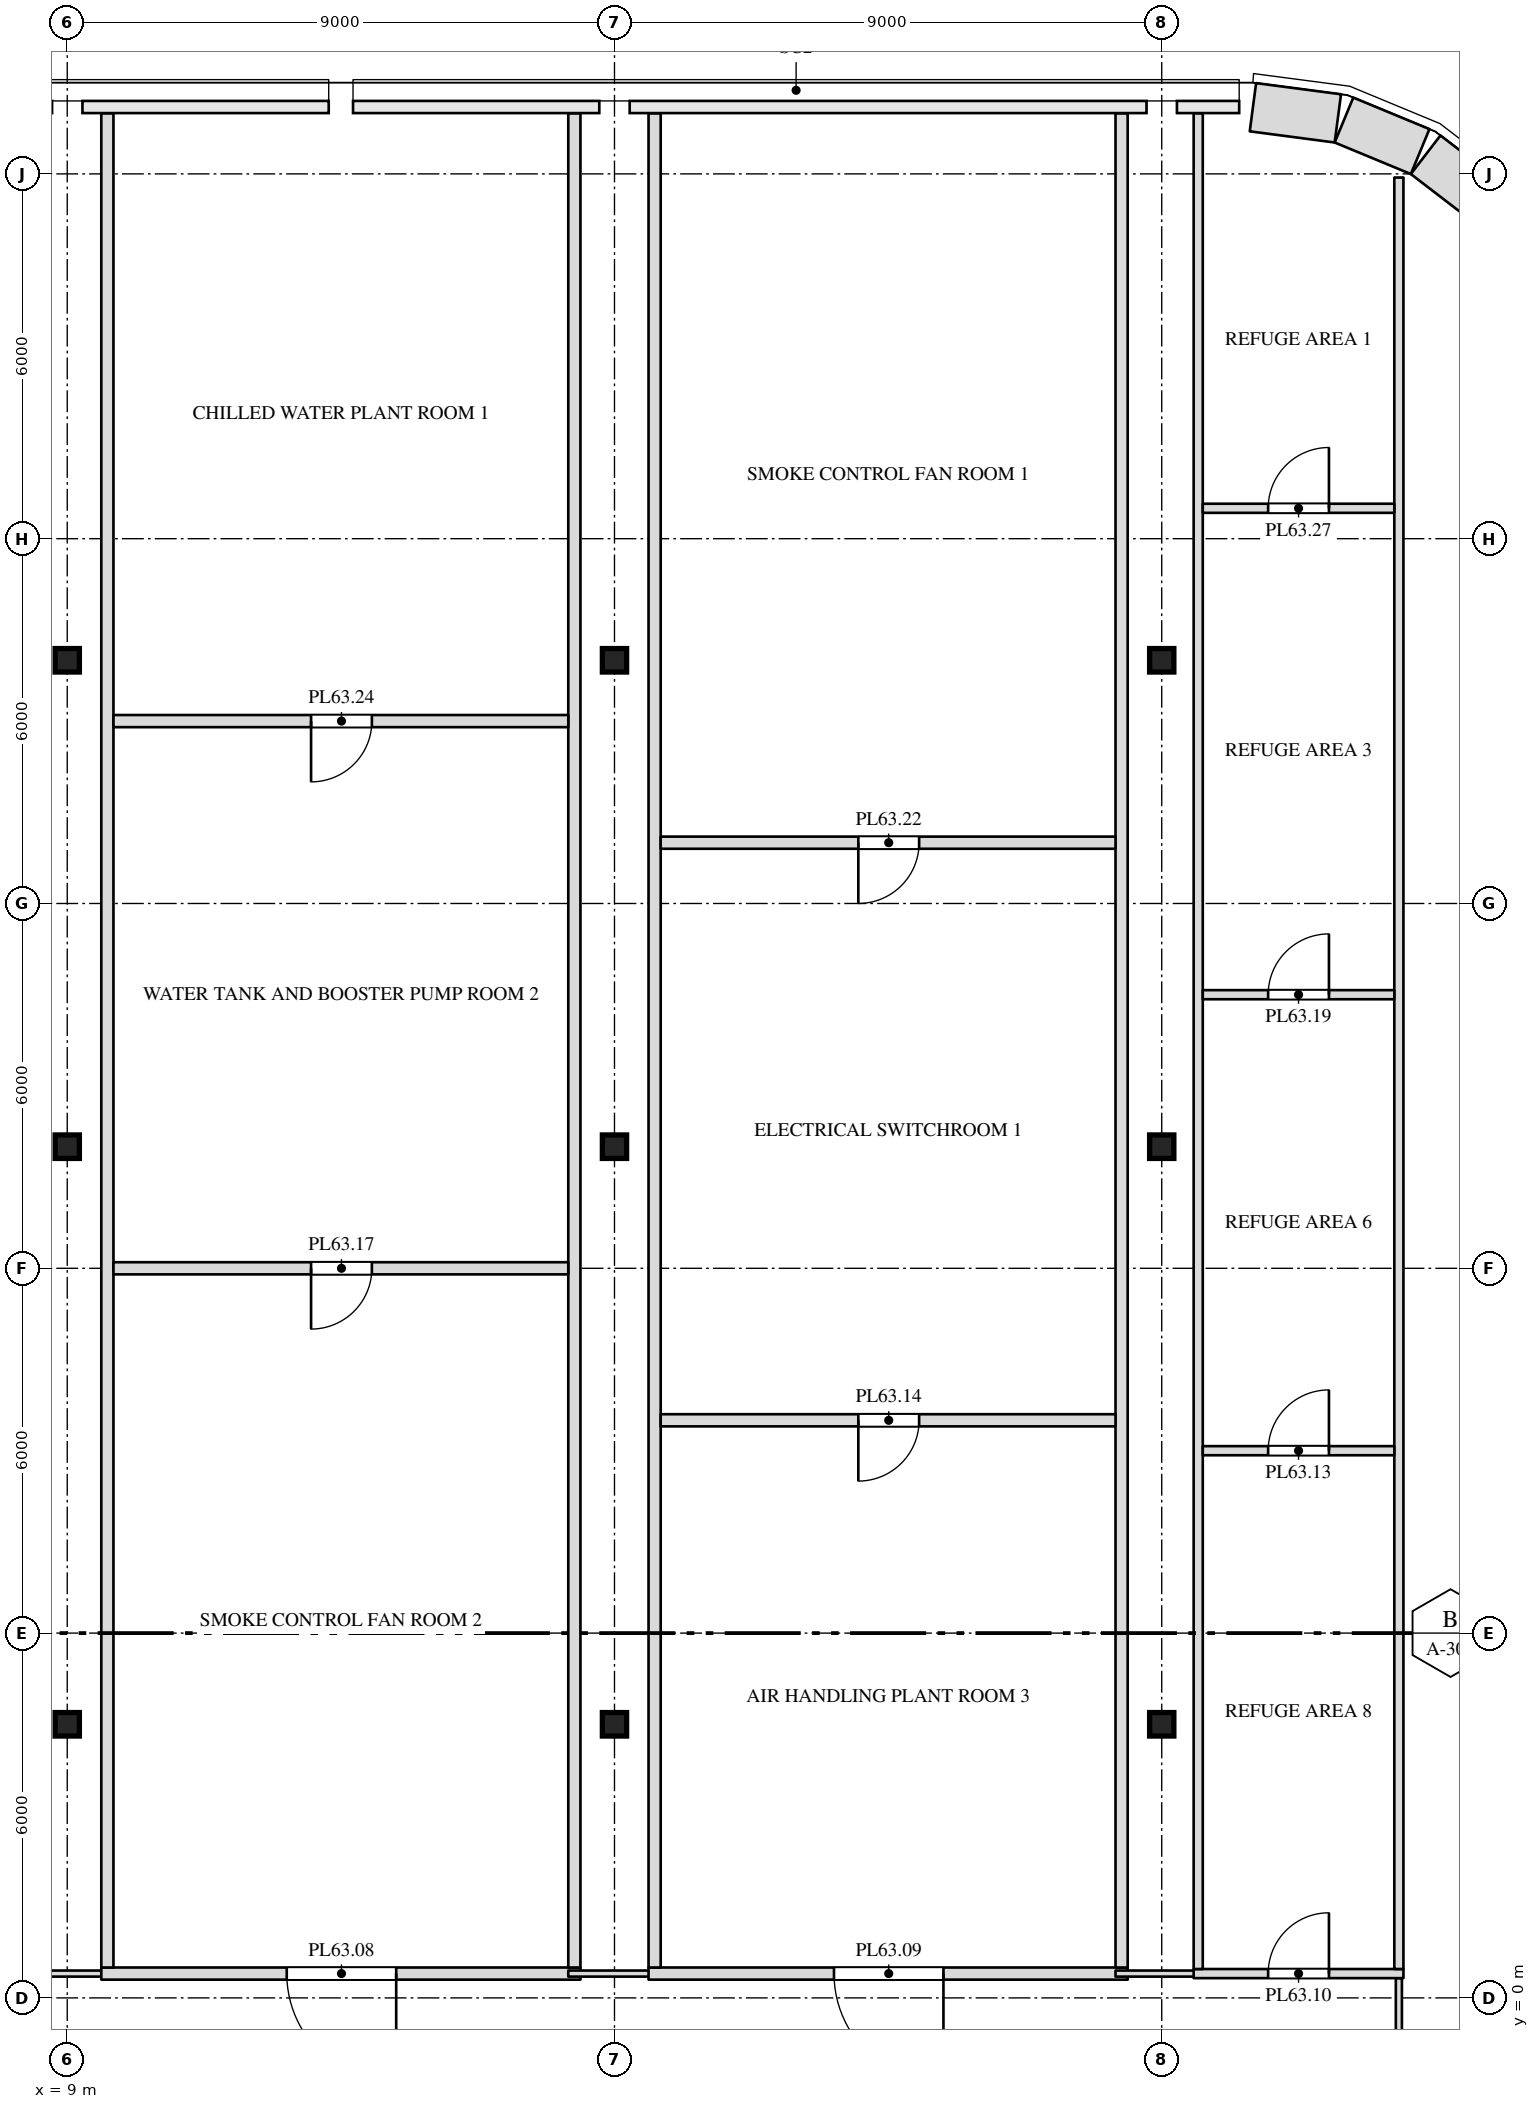
"""IFC4 building model, lengths in metres.
Left out: names, types, materials, properties, quantities, classifications, styles, units other than length and angle.
Written with IfcOpenShell. Run it as: python <this file> out.ifc"""

import sys

from ifc_helpers import new_model, si_unit, direction, frame, frame_2d, origin, origin_2d, place, context, subcontext, project, spatial, rectangle, i_section, extrude, element, fill, save


model = new_model("IFC4")
c1 = context("Model", 3, precision=1e-05, world=origin(), true_north=direction((0.0, 1.0)))
c2 = subcontext(c1, "Body", "Model", "MODEL_VIEW")
j1 = project(units=[si_unit("LENGTHUNIT", "METRE"), si_unit("PLANEANGLEUNIT", "RADIAN")], contexts=[c1])
p1 = place(None, origin())
s1 = spatial("IfcSite", under=j1, at=p1, CompositionType="ELEMENT")
p2 = place(p1, origin())
s2 = spatial("IfcBuilding", under=s1, at=p2, CompositionType="ELEMENT")
p3 = place(p2, frame((0.0, 0.0, 268.5)))
s3 = spatial("IfcBuildingStorey", under=s2, at=p3, CompositionType="ELEMENT", Elevation=268.5)
for number, where, z_axis, x_axis in (
    (1, (9.0, 4.5, 0.0), (0.0, 0.0, 1.0), (1.0, 0.0, 0.0)),
    (2, (18.0, 4.5, 0.0), (0.0, 0.0, 1.0), (1.0, 0.0, 0.0)),
    (3, (27.0, 4.5, 0.0), (0.0, 0.0, 1.0), (1.0, 0.0, 0.0)),
    (4, (9.0, 14.0, 0.0), (0.0, 0.0, 1.0), (1.0, 0.0, 0.0)),
    (5, (18.0, 14.0, 0.0), (0.0, 0.0, 1.0), (1.0, 0.0, 0.0)),
    (6, (27.0, 14.0, 0.0), (0.0, 0.0, 1.0), (1.0, 0.0, 0.0)),
    (7, (9.0, 22.0, 0.0), (0.0, 0.0, 1.0), (1.0, 0.0, 0.0)),
    (8, (18.0, 22.0, 0.0), (0.0, 0.0, 1.0), (1.0, 0.0, 0.0)),
    (9, (27.0, 22.0, 0.0), (0.0, 0.0, 1.0), (1.0, 0.0, 0.0)),
):
    element("IfcColumn", number, at=place(p3, frame(where, z_axis=z_axis, x_axis=x_axis)), inside=s3, PredefinedType="COLUMN", context=c2, shape_type="SweptSolid", body=[
        extrude(i_section(OverallWidth=0.399, OverallDepth=0.386, WebThickness=0.021, FlangeThickness=0.033, at=origin_2d()), origin(), (0.0, 0.0, 1.0), 4.0),
    ])
p4 = place(p3, frame((30.9, -1.925, 0.0), z_axis=(0.0, 0.0, 1.0), x_axis=(0.0, 1.0, 0.0)))
e10 = element("IfcWall", 10, at=p4, inside=s3, PredefinedType="PARTITIONING", context=c2, shape_type="SweptSolid", body=[
    extrude(rectangle(XDim=2.25, YDim=0.1, at=frame_2d((1.125, 0.0))), origin(), (0.0, 0.0, 1.0), 3.78),
])
p5 = place(p3, frame((8.24, 0.4, 0.0), z_axis=(0.0, 0.0, 1.0), x_axis=(1.0, 0.0, 0.0)))
e11 = element("IfcWall", 11, at=p5, inside=s3, PredefinedType="PARTITIONING", context=c2, shape_type="SweptSolid", body=[
    extrude(rectangle(XDim=1.52, YDim=0.1, at=frame_2d((0.76, 0.0))), origin(), (0.0, 0.0, 1.0), 3.78),
])
p6 = place(p3, frame((9.56, 0.4, 0.0), z_axis=(0.0, 0.0, 1.0), x_axis=(1.0, 0.0, 0.0)))
e12 = element("IfcWall", 12, at=p6, inside=s3, PredefinedType="PARTITIONING", context=c2, shape_type="SweptSolid", body=[
    extrude(rectangle(XDim=7.88, YDim=0.2, at=frame_2d((3.94, 0.0))), origin(), (0.0, 0.0, 1.0), 3.78),
])
p7 = place(p6, frame((3.05, 0.0, 0.0)))
e13 = element("IfcOpeningElement", 13, at=p7, cuts=e12, PredefinedType="OPENING", context=c2, shape_type="SweptSolid", body=[
    extrude(rectangle(XDim=1.8, YDim=2.1, at=frame_2d((0.9, 1.05))), frame((0.0, 0.112, 0.0), z_axis=(0.0, -1.0, 0.0), x_axis=(1.0, 0.0, 0.0)), (0.0, 0.0, 1.0), 0.224),
])
p8 = place(p3, frame((9.66, 0.5, 0.0), z_axis=(0.0, 0.0, 1.0), x_axis=(0.0, 1.0, 0.0)))
e14 = element("IfcWall", 14, at=p8, inside=s3, PredefinedType="PARTITIONING", context=c2, shape_type="SweptSolid", body=[
    extrude(rectangle(XDim=30.496, YDim=0.2, at=frame_2d((15.248, 0.0))), origin(), (0.0, 0.0, 1.0), 3.78),
])
p9 = place(p3, frame((17.24, 0.4, 0.0), z_axis=(0.0, 0.0, 1.0), x_axis=(1.0, 0.0, 0.0)))
e15 = element("IfcWall", 15, at=p9, inside=s3, PredefinedType="PARTITIONING", context=c2, shape_type="SweptSolid", body=[
    extrude(rectangle(XDim=1.52, YDim=0.1, at=frame_2d((0.76, 0.0))), origin(), (0.0, 0.0, 1.0), 3.78),
])
p10 = place(p3, frame((17.34, 0.5, 0.0), z_axis=(0.0, 0.0, 1.0), x_axis=(0.0, 1.0, 0.0)))
e16 = element("IfcWall", 16, at=p10, inside=s3, PredefinedType="PARTITIONING", context=c2, shape_type="SweptSolid", body=[
    extrude(rectangle(XDim=30.496, YDim=0.2, at=frame_2d((15.248, 0.0))), origin(), (0.0, 0.0, 1.0), 3.78),
])
p11 = place(p3, frame((18.56, 0.4, 0.0), z_axis=(0.0, 0.0, 1.0), x_axis=(1.0, 0.0, 0.0)))
e17 = element("IfcWall", 17, at=p11, inside=s3, PredefinedType="PARTITIONING", context=c2, shape_type="SweptSolid", body=[
    extrude(rectangle(XDim=7.88, YDim=0.2, at=frame_2d((3.94, 0.0))), origin(), (0.0, 0.0, 1.0), 3.78),
])
p12 = place(p11, frame((3.05, 0.0, 0.0)))
e18 = element("IfcOpeningElement", 18, at=p12, cuts=e17, PredefinedType="OPENING", context=c2, shape_type="SweptSolid", body=[
    extrude(rectangle(XDim=1.8, YDim=2.1, at=frame_2d((0.9, 1.05))), frame((0.0, 0.112, 0.0), z_axis=(0.0, -1.0, 0.0), x_axis=(1.0, 0.0, 0.0)), (0.0, 0.0, 1.0), 0.224),
])
p13 = place(p3, frame((18.66, 0.5, 0.0), z_axis=(0.0, 0.0, 1.0), x_axis=(0.0, 1.0, 0.0)))
e19 = element("IfcWall", 19, at=p13, inside=s3, PredefinedType="PARTITIONING", context=c2, shape_type="SweptSolid", body=[
    extrude(rectangle(XDim=30.496, YDim=0.2, at=frame_2d((15.248, 0.0))), origin(), (0.0, 0.0, 1.0), 3.78),
])
p14 = place(p3, frame((26.24, 0.4, 0.0), z_axis=(0.0, 0.0, 1.0), x_axis=(1.0, 0.0, 0.0)))
e20 = element("IfcWall", 20, at=p14, inside=s3, PredefinedType="PARTITIONING", context=c2, shape_type="SweptSolid", body=[
    extrude(rectangle(XDim=1.435, YDim=0.1, at=frame_2d((0.718, 0.0))), origin(), (0.0, 0.0, 1.0), 3.78),
])
p15 = place(p3, frame((26.34, 0.5, 0.0), z_axis=(0.0, 0.0, 1.0), x_axis=(0.0, 1.0, 0.0)))
e21 = element("IfcWall", 21, at=p15, inside=s3, PredefinedType="PARTITIONING", context=c2, shape_type="SweptSolid", body=[
    extrude(rectangle(XDim=30.496, YDim=0.2, at=frame_2d((15.248, 0.0))), origin(), (0.0, 0.0, 1.0), 3.78),
])
p16 = place(p3, frame((27.525, 0.4, 0.0), z_axis=(0.0, 0.0, 1.0), x_axis=(1.0, 0.0, 0.0)))
e22 = element("IfcWall", 22, at=p16, inside=s3, PredefinedType="PARTITIONING", context=c2, shape_type="SweptSolid", body=[
    extrude(rectangle(XDim=3.45, YDim=0.15, at=frame_2d((1.725, 0.0))), origin(), (0.0, 0.0, 1.0), 3.78),
])
p17 = place(p16, frame((1.225, 0.0, 0.0)))
e23 = element("IfcOpeningElement", 23, at=p17, cuts=e22, PredefinedType="OPENING", context=c2, shape_type="SweptSolid", body=[
    extrude(rectangle(XDim=1.0, YDim=2.1, at=frame_2d((0.5, 1.05))), frame((0.0, 0.087, 0.0), z_axis=(0.0, -1.0, 0.0), x_axis=(1.0, 0.0, 0.0)), (0.0, 0.0, 1.0), 0.174),
])
p18 = place(p3, frame((27.6, 0.475, 0.0), z_axis=(0.0, 0.0, 1.0), x_axis=(0.0, 1.0, 0.0)))
e24 = element("IfcWall", 24, at=p18, inside=s3, PredefinedType="PARTITIONING", context=c2, shape_type="SweptSolid", body=[
    extrude(rectangle(XDim=30.521, YDim=0.15, at=frame_2d((15.26, 0.0))), origin(), (0.0, 0.0, 1.0), 3.78),
])
p19 = place(p3, frame((30.9, 0.475, 0.0), z_axis=(0.0, 0.0, 1.0), x_axis=(0.0, 1.0, 0.0)))
e25 = element("IfcWall", 25, at=p19, inside=s3, PredefinedType="PARTITIONING", context=c2, shape_type="SweptSolid", body=[
    extrude(rectangle(XDim=29.465, YDim=0.15, at=frame_2d((14.732, 0.0))), origin(), (0.0, 0.0, 1.0), 3.78),
])
p20 = place(p3, frame((27.675, 9.0, 0.0), z_axis=(0.0, 0.0, 1.0), x_axis=(1.0, 0.0, 0.0)))
e26 = element("IfcWall", 26, at=p20, inside=s3, PredefinedType="PARTITIONING", context=c2, shape_type="SweptSolid", body=[
    extrude(rectangle(XDim=3.15, YDim=0.15, at=frame_2d((1.575, 0.0))), origin(), (0.0, 0.0, 1.0), 3.247),
])
p21 = place(p20, frame((1.075, 0.0, 0.0)))
e27 = element("IfcOpeningElement", 27, at=p21, cuts=e26, PredefinedType="OPENING", context=c2, shape_type="SweptSolid", body=[
    extrude(rectangle(XDim=1.0, YDim=2.1, at=frame_2d((0.5, 1.05))), frame((0.0, 0.087, 0.0), z_axis=(0.0, -1.0, 0.0), x_axis=(1.0, 0.0, 0.0)), (0.0, 0.0, 1.0), 0.174),
])
p22 = place(p3, frame((18.76, 9.5, 0.0), z_axis=(0.0, 0.0, 1.0), x_axis=(1.0, 0.0, 0.0)))
e28 = element("IfcWall", 28, at=p22, inside=s3, PredefinedType="PARTITIONING", context=c2, shape_type="SweptSolid", body=[
    extrude(rectangle(XDim=7.48, YDim=0.2, at=frame_2d((3.74, 0.0))), origin(), (0.0, 0.0, 1.0), 3.78),
])
p23 = place(p22, frame((3.25, 0.0, 0.0)))
e29 = element("IfcOpeningElement", 29, at=p23, cuts=e28, PredefinedType="OPENING", context=c2, shape_type="SweptSolid", body=[
    extrude(rectangle(XDim=1.0, YDim=2.1, at=frame_2d((0.5, 1.05))), frame((0.0, 0.112, 0.0), z_axis=(0.0, -1.0, 0.0), x_axis=(1.0, 0.0, 0.0)), (0.0, 0.0, 1.0), 0.224),
])
p24 = place(p3, frame((9.76, 12.0, 0.0), z_axis=(0.0, 0.0, 1.0), x_axis=(1.0, 0.0, 0.0)))
e30 = element("IfcWall", 30, at=p24, inside=s3, PredefinedType="PARTITIONING", context=c2, shape_type="SweptSolid", body=[
    extrude(rectangle(XDim=7.48, YDim=0.2, at=frame_2d((3.74, 0.0))), origin(), (0.0, 0.0, 1.0), 3.78),
])
p25 = place(p24, frame((3.25, 0.0, 0.0)))
e31 = element("IfcOpeningElement", 31, at=p25, cuts=e30, PredefinedType="OPENING", context=c2, shape_type="SweptSolid", body=[
    extrude(rectangle(XDim=1.0, YDim=2.1, at=frame_2d((0.5, 1.05))), frame((0.0, 0.112, 0.0), z_axis=(0.0, -1.0, 0.0), x_axis=(1.0, 0.0, 0.0)), (0.0, 0.0, 1.0), 0.224),
])
p26 = place(p3, frame((27.675, 16.5, 0.0), z_axis=(0.0, 0.0, 1.0), x_axis=(1.0, 0.0, 0.0)))
e32 = element("IfcWall", 32, at=p26, inside=s3, PredefinedType="PARTITIONING", context=c2, shape_type="SweptSolid", body=[
    extrude(rectangle(XDim=3.15, YDim=0.15, at=frame_2d((1.575, 0.0))), origin(), (0.0, 0.0, 1.0), 3.78),
])
p27 = place(p26, frame((1.075, 0.0, 0.0)))
e33 = element("IfcOpeningElement", 33, at=p27, cuts=e32, PredefinedType="OPENING", context=c2, shape_type="SweptSolid", body=[
    extrude(rectangle(XDim=1.0, YDim=2.1, at=frame_2d((0.5, 1.05))), frame((0.0, 0.087, 0.0), z_axis=(0.0, -1.0, 0.0), x_axis=(1.0, 0.0, 0.0)), (0.0, 0.0, 1.0), 0.174),
])
p28 = place(p3, frame((18.76, 19.0, 0.0), z_axis=(0.0, 0.0, 1.0), x_axis=(1.0, 0.0, 0.0)))
e34 = element("IfcWall", 34, at=p28, inside=s3, PredefinedType="PARTITIONING", context=c2, shape_type="SweptSolid", body=[
    extrude(rectangle(XDim=7.48, YDim=0.2, at=frame_2d((3.74, 0.0))), origin(), (0.0, 0.0, 1.0), 3.78),
])
p29 = place(p28, frame((3.25, 0.0, 0.0)))
e35 = element("IfcOpeningElement", 35, at=p29, cuts=e34, PredefinedType="OPENING", context=c2, shape_type="SweptSolid", body=[
    extrude(rectangle(XDim=1.0, YDim=2.1, at=frame_2d((0.5, 1.05))), frame((0.0, 0.112, 0.0), z_axis=(0.0, -1.0, 0.0), x_axis=(1.0, 0.0, 0.0)), (0.0, 0.0, 1.0), 0.224),
])
p30 = place(p3, frame((9.76, 21.0, 0.0), z_axis=(0.0, 0.0, 1.0), x_axis=(1.0, 0.0, 0.0)))
e36 = element("IfcWall", 36, at=p30, inside=s3, PredefinedType="PARTITIONING", context=c2, shape_type="SweptSolid", body=[
    extrude(rectangle(XDim=7.48, YDim=0.2, at=frame_2d((3.74, 0.0))), origin(), (0.0, 0.0, 1.0), 3.78),
])
p31 = place(p30, frame((3.25, 0.0, 0.0)))
e37 = element("IfcOpeningElement", 37, at=p31, cuts=e36, PredefinedType="OPENING", context=c2, shape_type="SweptSolid", body=[
    extrude(rectangle(XDim=1.0, YDim=2.1, at=frame_2d((0.5, 1.05))), frame((0.0, 0.112, 0.0), z_axis=(0.0, -1.0, 0.0), x_axis=(1.0, 0.0, 0.0)), (0.0, 0.0, 1.0), 0.224),
])
p32 = place(p3, frame((27.675, 24.5, 0.0), z_axis=(0.0, 0.0, 1.0), x_axis=(1.0, 0.0, 0.0)))
e38 = element("IfcWall", 38, at=p32, inside=s3, PredefinedType="PARTITIONING", context=c2, shape_type="SweptSolid", body=[
    extrude(rectangle(XDim=3.15, YDim=0.15, at=frame_2d((1.575, 0.0))), origin(), (0.0, 0.0, 1.0), 3.78),
])
p33 = place(p32, frame((1.075, 0.0, 0.0)))
e39 = element("IfcOpeningElement", 39, at=p33, cuts=e38, PredefinedType="OPENING", context=c2, shape_type="SweptSolid", body=[
    extrude(rectangle(XDim=1.0, YDim=2.1, at=frame_2d((0.5, 1.05))), frame((0.0, 0.087, 0.0), z_axis=(0.0, -1.0, 0.0), x_axis=(1.0, 0.0, 0.0)), (0.0, 0.0, 1.0), 0.174),
])
p34 = place(p3, frame((32.416, 29.489, 0.0), z_axis=(0.0, 0.0, 1.0), x_axis=(-0.793272915452, 0.608866226366, 0.0)))
e40 = element("IfcWall", 40, at=p34, inside=s3, PredefinedType="SOLIDWALL", context=c2, shape_type="SweptSolid", body=[
    extrude(rectangle(XDim=1.356, YDim=0.8, at=frame_2d((0.678, 0.0))), origin(), (0.0, 0.0, 1.0), 3.78),
])
p35 = place(p3, frame((31.25, 30.367, 0.0), z_axis=(0.0, 0.0, 1.0), x_axis=(-0.923847774587, 0.38276009378, 0.0)))
e41 = element("IfcWall", 41, at=p35, inside=s3, PredefinedType="SOLIDWALL", context=c2, shape_type="SweptSolid", body=[
    extrude(rectangle(XDim=1.355, YDim=0.8, at=frame_2d((0.678, 0.0))), origin(), (0.0, 0.0, 1.0), 3.78),
])
p36 = place(p3, frame((29.896, 30.913, 0.0), z_axis=(0.0, 0.0, 1.0), x_axis=(-0.99144603414, 0.130517283865, 0.0)))
e42 = element("IfcWall", 42, at=p36, inside=s3, PredefinedType="SOLIDWALL", context=c2, shape_type="SweptSolid", body=[
    extrude(rectangle(XDim=1.408, YDim=0.8, at=frame_2d((0.704, 0.0))), origin(), (0.0, 0.0, 1.0), 3.78),
])
p37 = place(p7, origin())
e43 = element("IfcDoor", 43, at=p37, inside=s3, OperationType="DOUBLE_DOOR_SINGLE_SWING", PredefinedType="DOOR", context=c2, shape_type="SweptSolid", body=[
    extrude(rectangle(XDim=1.8, YDim=2.1, at=frame_2d((0.9, 1.05))), frame((0.0, 0.025, 0.0), z_axis=(0.0, -1.0, 0.0), x_axis=(1.0, 0.0, 0.0)), (0.0, 0.0, 1.0), 0.05),
])
fill(e13, e43)
p38 = place(p12, origin())
e44 = element("IfcDoor", 44, at=p38, inside=s3, OperationType="DOUBLE_DOOR_SINGLE_SWING", PredefinedType="DOOR", context=c2, shape_type="SweptSolid", body=[
    extrude(rectangle(XDim=1.8, YDim=2.1, at=frame_2d((0.9, 1.05))), frame((0.0, 0.025, 0.0), z_axis=(0.0, -1.0, 0.0), x_axis=(1.0, 0.0, 0.0)), (0.0, 0.0, 1.0), 0.05),
])
fill(e18, e44)
p39 = place(p17, origin())
e45 = element("IfcDoor", 45, at=p39, inside=s3, OperationType="SINGLE_SWING_RIGHT", PredefinedType="DOOR", context=c2, shape_type="SweptSolid", body=[
    extrude(rectangle(XDim=1.0, YDim=2.1, at=frame_2d((0.5, 1.05))), frame((0.0, 0.025, 0.0), z_axis=(0.0, -1.0, 0.0), x_axis=(1.0, 0.0, 0.0)), (0.0, 0.0, 1.0), 0.05),
])
fill(e23, e45)
p40 = place(p21, origin())
e46 = element("IfcDoor", 46, at=p40, inside=s3, OperationType="SINGLE_SWING_RIGHT", PredefinedType="DOOR", context=c2, shape_type="SweptSolid", body=[
    extrude(rectangle(XDim=1.0, YDim=2.1, at=frame_2d((0.5, 1.05))), frame((0.0, 0.025, 0.0), z_axis=(0.0, -1.0, 0.0), x_axis=(1.0, 0.0, 0.0)), (0.0, 0.0, 1.0), 0.05),
])
fill(e27, e46)
p41 = place(p23, origin())
e47 = element("IfcDoor", 47, at=p41, inside=s3, OperationType="SINGLE_SWING_RIGHT", PredefinedType="DOOR", context=c2, shape_type="SweptSolid", body=[
    extrude(rectangle(XDim=1.0, YDim=2.1, at=frame_2d((0.5, 1.05))), frame((0.0, 0.025, 0.0), z_axis=(0.0, -1.0, 0.0), x_axis=(1.0, 0.0, 0.0)), (0.0, 0.0, 1.0), 0.05),
])
fill(e29, e47)
p42 = place(p25, origin())
e48 = element("IfcDoor", 48, at=p42, inside=s3, OperationType="SINGLE_SWING_RIGHT", PredefinedType="DOOR", context=c2, shape_type="SweptSolid", body=[
    extrude(rectangle(XDim=1.0, YDim=2.1, at=frame_2d((0.5, 1.05))), frame((0.0, 0.025, 0.0), z_axis=(0.0, -1.0, 0.0), x_axis=(1.0, 0.0, 0.0)), (0.0, 0.0, 1.0), 0.05),
])
fill(e31, e48)
p43 = place(p27, origin())
e49 = element("IfcDoor", 49, at=p43, inside=s3, OperationType="SINGLE_SWING_RIGHT", PredefinedType="DOOR", context=c2, shape_type="SweptSolid", body=[
    extrude(rectangle(XDim=1.0, YDim=2.1, at=frame_2d((0.5, 1.05))), frame((0.0, 0.025, 0.0), z_axis=(0.0, -1.0, 0.0), x_axis=(1.0, 0.0, 0.0)), (0.0, 0.0, 1.0), 0.05),
])
fill(e33, e49)
p44 = place(p29, origin())
e50 = element("IfcDoor", 50, at=p44, inside=s3, OperationType="SINGLE_SWING_RIGHT", PredefinedType="DOOR", context=c2, shape_type="SweptSolid", body=[
    extrude(rectangle(XDim=1.0, YDim=2.1, at=frame_2d((0.5, 1.05))), frame((0.0, 0.025, 0.0), z_axis=(0.0, -1.0, 0.0), x_axis=(1.0, 0.0, 0.0)), (0.0, 0.0, 1.0), 0.05),
])
fill(e35, e50)
p45 = place(p31, origin())
e51 = element("IfcDoor", 51, at=p45, inside=s3, OperationType="SINGLE_SWING_RIGHT", PredefinedType="DOOR", context=c2, shape_type="SweptSolid", body=[
    extrude(rectangle(XDim=1.0, YDim=2.1, at=frame_2d((0.5, 1.05))), frame((0.0, 0.025, 0.0), z_axis=(0.0, -1.0, 0.0), x_axis=(1.0, 0.0, 0.0)), (0.0, 0.0, 1.0), 0.05),
])
fill(e37, e51)
p46 = place(p33, origin())
e52 = element("IfcDoor", 52, at=p46, inside=s3, OperationType="SINGLE_SWING_RIGHT", PredefinedType="DOOR", context=c2, shape_type="SweptSolid", body=[
    extrude(rectangle(XDim=1.0, YDim=2.1, at=frame_2d((0.5, 1.05))), frame((0.0, 0.025, 0.0), z_axis=(0.0, -1.0, 0.0), x_axis=(1.0, 0.0, 0.0)), (0.0, 0.0, 1.0), 0.05),
])
fill(e39, e52)
save(model, sys.argv[1])
